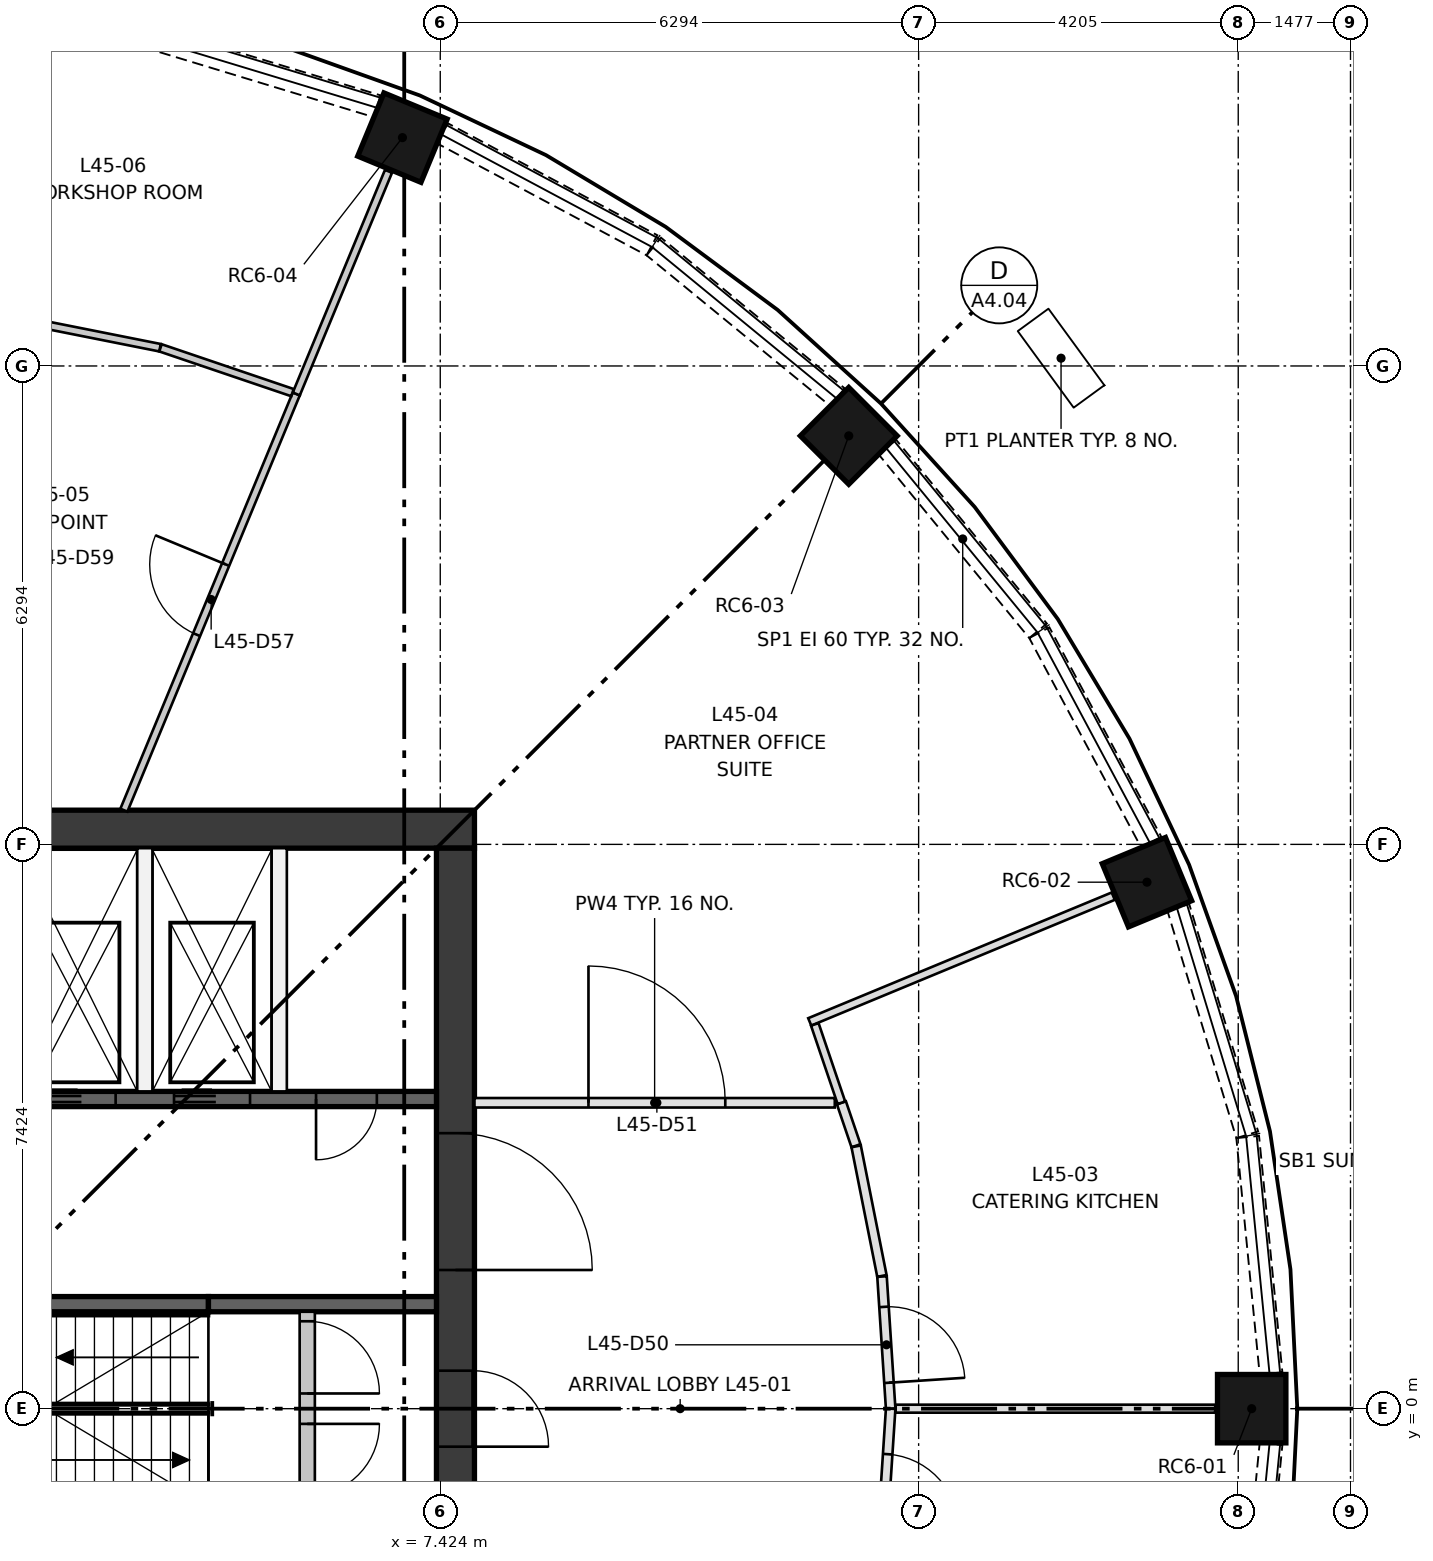
"""IFC4 building model, lengths in metres.
Left out: names, types, materials, properties, quantities, classifications, styles, units other than length and angle.
Written with IfcOpenShell. Run it as: python <this file> out.ifc"""

import sys

from ifc_helpers import new_model, si_unit, direction, frame, frame_2d, origin, origin_2d, place, context, subcontext, project, spatial, rectangle, extrude, element, fill, save


model = new_model("IFC4")
c1 = context("Model", 3, precision=1e-05, world=origin(), true_north=direction((0.0, 1.0)))
c2 = subcontext(c1, "Body", "Model", "MODEL_VIEW")
j1 = project(units=[si_unit("LENGTHUNIT", "METRE"), si_unit("PLANEANGLEUNIT", "RADIAN")], contexts=[c1])
p1 = place(None, origin())
s1 = spatial("IfcSite", under=j1, at=p1, CompositionType="ELEMENT")
p2 = place(p1, origin())
s2 = spatial("IfcBuilding", under=s1, at=p2, CompositionType="ELEMENT")
p3 = place(p2, frame((0.0, 0.0, 170.9)))
s3 = spatial("IfcBuildingStorey", under=s2, at=p3, CompositionType="ELEMENT", Elevation=170.9)
for number, where, z_axis, x_axis in (
    (1, (18.1, 0.0, 0.0), (0.0, 0.0, 1.0), (1.0, 0.0, 0.0)),
    (2, (16.722, 6.927, 0.0), (0.0, 0.0, 1.0), (0.924, 0.383, 0.0)),
    (3, (12.799, 12.799, 0.0), (0.0, 0.0, 1.0), (0.707, 0.707, 0.0)),
    (4, (6.927, 16.722, 0.0), (0.0, 0.0, 1.0), (0.383, 0.924, 0.0)),
):
    element("IfcColumn", number, at=place(p3, frame(where, z_axis=z_axis, x_axis=x_axis)), inside=s3, PredefinedType="COLUMN", context=c2, shape_type="SweptSolid", body=[
        extrude(rectangle(XDim=0.9, YDim=0.9, at=origin_2d()), origin(), (0.0, 0.0, 1.0), 3.35),
    ])
p4 = place(p3, frame((-7.874, 7.624, 0.0), z_axis=(0.0, 0.0, 1.0), x_axis=(1.0, 0.0, 0.0)))
e5 = element("IfcWall", 5, at=p4, inside=s3, PredefinedType="SHEAR", context=c2, shape_type="SweptSolid", body=[
    extrude(rectangle(XDim=15.748, YDim=0.5, at=frame_2d((7.874, 0.0))), origin(), (0.0, 0.0, 1.0), 3.35),
])
p5 = place(p3, frame((7.624, -7.374, 0.0), z_axis=(0.0, 0.0, 1.0), x_axis=(0.0, 1.0, 0.0)))
e6 = element("IfcWall", 6, at=p5, inside=s3, PredefinedType="SHEAR", context=c2, shape_type="SweptSolid", body=[
    extrude(rectangle(XDim=14.748, YDim=0.5, at=frame_2d((7.374, 0.0))), origin(), (0.0, 0.0, 1.0), 3.35),
])
p6 = place(p5, frame((6.874, 0.0, 0.0)))
e7 = element("IfcOpeningElement", 7, at=p6, cuts=e6, PredefinedType="OPENING", context=c2, shape_type="SweptSolid", body=[
    extrude(rectangle(XDim=1.0, YDim=2.1, at=frame_2d((0.5, 1.05))), frame((0.0, 0.26, 0.0), z_axis=(0.0, -1.0, 0.0), x_axis=(1.0, 0.0, 0.0)), (0.0, 0.0, 1.0), 0.52),
])
p7 = place(p5, frame((3.75, 0.0, 0.0)))
e8 = element("IfcOpeningElement", 8, at=p7, cuts=e6, PredefinedType="OPENING", context=c2, shape_type="SweptSolid", body=[
    extrude(rectangle(XDim=1.8, YDim=2.1, at=frame_2d((0.9, 1.05))), frame((0.0, 0.26, 0.0), z_axis=(0.0, -1.0, 0.0), x_axis=(1.0, 0.0, 0.0)), (0.0, 0.0, 1.0), 0.52),
])
p8 = place(p5, frame((9.198, 0.0, 0.0)))
e9 = element("IfcOpeningElement", 9, at=p8, cuts=e6, PredefinedType="OPENING", context=c2, shape_type="SweptSolid", body=[
    extrude(rectangle(XDim=1.8, YDim=2.1, at=frame_2d((0.9, 1.05))), frame((0.0, 0.26, 0.0), z_axis=(0.0, -1.0, 0.0), x_axis=(1.0, 0.0, 0.0)), (0.0, 0.0, 1.0), 0.52),
])
p9 = place(p3, frame((0.0, 4.074, 0.0), z_axis=(0.0, 0.0, 1.0), x_axis=(1.0, 0.0, 0.0)))
e10 = element("IfcWall", 10, at=p9, inside=s3, PredefinedType="SHEAR", context=c2, shape_type="SweptSolid", body=[
    extrude(rectangle(XDim=7.374, YDim=0.2, at=frame_2d((3.687, 0.0))), origin(), (0.0, 0.0, 1.0), 3.0),
])
p10 = place(p9, frame((0.384, 0.0, 0.0)))
e11 = element("IfcOpeningElement", 11, at=p10, cuts=e10, PredefinedType="OPENING", context=c2, shape_type="SweptSolid", body=[
    extrude(rectangle(XDim=1.0, YDim=2.1, at=frame_2d((0.5, 1.05))), frame((0.0, 0.11, 0.0), z_axis=(0.0, -1.0, 0.0), x_axis=(1.0, 0.0, 0.0)), (0.0, 0.0, 1.0), 0.22),
])
p11 = place(p9, frame((2.153, 0.0, 0.0)))
e12 = element("IfcOpeningElement", 12, at=p11, cuts=e10, PredefinedType="OPENING", context=c2, shape_type="SweptSolid", body=[
    extrude(rectangle(XDim=1.0, YDim=2.1, at=frame_2d((0.5, 1.05))), frame((0.0, 0.11, 0.0), z_axis=(0.0, -1.0, 0.0), x_axis=(1.0, 0.0, 0.0)), (0.0, 0.0, 1.0), 0.22),
])
p12 = place(p9, frame((3.921, 0.0, 0.0)))
e13 = element("IfcOpeningElement", 13, at=p12, cuts=e10, PredefinedType="OPENING", context=c2, shape_type="SweptSolid", body=[
    extrude(rectangle(XDim=1.0, YDim=2.1, at=frame_2d((0.5, 1.05))), frame((0.0, 0.11, 0.0), z_axis=(0.0, -1.0, 0.0), x_axis=(1.0, 0.0, 0.0)), (0.0, 0.0, 1.0), 0.22),
])
p13 = place(p9, frame((5.79, 0.0, 0.0)))
e14 = element("IfcOpeningElement", 14, at=p13, cuts=e10, PredefinedType="OPENING", context=c2, shape_type="SweptSolid", body=[
    extrude(rectangle(XDim=0.8, YDim=2.1, at=frame_2d((0.4, 1.05))), frame((0.0, 0.11, 0.0), z_axis=(0.0, -1.0, 0.0), x_axis=(1.0, 0.0, 0.0)), (0.0, 0.0, 1.0), 0.22),
])
p14 = place(p3, frame((0.0, 1.375, 0.0), z_axis=(0.0, 0.0, 1.0), x_axis=(1.0, 0.0, 0.0)))
e15 = element("IfcWall", 15, at=p14, inside=s3, PredefinedType="SHEAR", context=c2, shape_type="SweptSolid", body=[
    extrude(rectangle(XDim=4.374, YDim=0.2, at=frame_2d((2.187, 0.0))), origin(), (0.0, 0.0, 1.0), 3.0),
])
p15 = place(p3, frame((4.374, 1.375, 0.0), z_axis=(0.0, 0.0, 1.0), x_axis=(1.0, 0.0, 0.0)))
e16 = element("IfcWall", 16, at=p15, inside=s3, PredefinedType="SHEAR", context=c2, shape_type="SweptSolid", body=[
    extrude(rectangle(XDim=3.0, YDim=0.2, at=frame_2d((1.5, 0.0))), origin(), (0.0, 0.0, 1.0), 3.0),
])
for number, where, z_axis, x_axis in (
    (17, (3.537, 4.174, 0.0), (0.0, 0.0, 1.0), (0.0, 1.0, 0.0)),
    (18, (5.305, 4.174, 0.0), (0.0, 0.0, 1.0), (0.0, 1.0, 0.0)),
):
    element("IfcWall", number, at=place(p3, frame(where, z_axis=z_axis, x_axis=x_axis)), inside=s3, PredefinedType="PARTITIONING", context=c2, shape_type="SweptSolid", body=[
        extrude(rectangle(XDim=3.2, YDim=0.2, at=frame_2d((1.6, 0.0))), origin(), (0.0, 0.0, 1.0), 3.0),
    ])
p16 = place(p3, frame((5.674, -1.275, 0.0), z_axis=(0.0, 0.0, 1.0), x_axis=(0.0, 1.0, 0.0)))
e19 = element("IfcWall", 19, at=p16, inside=s3, PredefinedType="PARTITIONING", context=c2, shape_type="SweptSolid", body=[
    extrude(rectangle(XDim=2.55, YDim=0.2, at=frame_2d((1.275, 0.0))), origin(), (0.0, 0.0, 1.0), 3.0),
])
p17 = place(p16, frame((0.125, 0.0, 0.0)))
e20 = element("IfcOpeningElement", 20, at=p17, cuts=e19, PredefinedType="OPENING", context=c2, shape_type="SweptSolid", body=[
    extrude(rectangle(XDim=0.95, YDim=2.1, at=frame_2d((0.475, 1.05))), frame((0.0, 0.11, 0.0), z_axis=(0.0, -1.0, 0.0), x_axis=(1.0, 0.0, 0.0)), (0.0, 0.0, 1.0), 0.22),
])
p18 = place(p16, frame((1.475, 0.0, 0.0)))
e21 = element("IfcOpeningElement", 21, at=p18, cuts=e19, PredefinedType="OPENING", context=c2, shape_type="SweptSolid", body=[
    extrude(rectangle(XDim=0.95, YDim=2.1, at=frame_2d((0.475, 1.05))), frame((0.0, 0.11, 0.0), z_axis=(0.0, -1.0, 0.0), x_axis=(1.0, 0.0, 0.0)), (0.0, 0.0, 1.0), 0.22),
])
p19 = place(p3, frame((18.354, 0.464, 0.0), z_axis=(0.0, 0.0, 1.0), x_axis=(-0.098188848083, 0.995167799978, 0.0)))
e22 = element("IfcWall", 22, at=p19, inside=s3, PredefinedType="SOLIDWALL", context=c2, shape_type="SweptSolid", body=[
    extrude(rectangle(XDim=3.125, YDim=0.3, at=frame_2d((1.563, 0.0))), origin(), (0.0, 0.0, 1.0), 0.9),
])
p20 = place(p3, frame((18.042, 3.604, 0.0), z_axis=(0.0, 0.0, 1.0), x_axis=(-0.290083245834, 0.957001416136, 0.0)))
e23 = element("IfcWall", 23, at=p20, inside=s3, PredefinedType="SOLIDWALL", context=c2, shape_type="SweptSolid", body=[
    extrude(rectangle(XDim=3.127, YDim=0.3, at=frame_2d((1.563, 0.0))), origin(), (0.0, 0.0, 1.0), 0.9),
])
p21 = place(p3, frame((16.779, 7.452, 0.0), z_axis=(0.0, 0.0, 1.0), x_axis=(-0.47120441036, 0.882024038027, 0.0)))
e24 = element("IfcWall", 24, at=p21, inside=s3, PredefinedType="SOLIDWALL", context=c2, shape_type="SweptSolid", body=[
    extrude(rectangle(XDim=3.125, YDim=0.3, at=frame_2d((1.562, 0.0))), origin(), (0.0, 0.0, 1.0), 0.9),
])
for number, where, z_axis, x_axis in (
    (25, (15.29, 10.234, 0.0), (0.0, 0.0, 1.0), (-0.634, 0.773, 0.0)),
    (26, (12.651, 13.306, 0.0), (0.0, 0.0, 1.0), (-0.773, 0.634, 0.0)),
):
    element("IfcWall", number, at=place(p3, frame(where, z_axis=z_axis, x_axis=x_axis)), inside=s3, PredefinedType="SOLIDWALL", context=c2, shape_type="SweptSolid", body=[
        extrude(rectangle(XDim=3.127, YDim=0.3, at=frame_2d((1.563, 0.0))), origin(), (0.0, 0.0, 1.0), 0.9),
    ])
p22 = place(p3, frame((10.209, 15.306, 0.0), z_axis=(0.0, 0.0, 1.0), x_axis=(-0.882024038027, 0.47120441036, 0.0)))
e27 = element("IfcWall", 27, at=p22, inside=s3, PredefinedType="SOLIDWALL", context=c2, shape_type="SweptSolid", body=[
    extrude(rectangle(XDim=3.125, YDim=0.3, at=frame_2d((1.562, 0.0))), origin(), (0.0, 0.0, 1.0), 0.9),
])
p23 = place(p3, frame((6.596, 17.135, 0.0), z_axis=(0.0, 0.0, 1.0), x_axis=(-0.957001416136, 0.290083245834, 0.0)))
e28 = element("IfcWall", 28, at=p23, inside=s3, PredefinedType="SOLIDWALL", context=c2, shape_type="SweptSolid", body=[
    extrude(rectangle(XDim=3.127, YDim=0.3, at=frame_2d((1.563, 0.0))), origin(), (0.0, 0.0, 1.0), 0.9),
])
p24 = place(p3, frame((18.048, -3.574, 0.0), z_axis=(0.0, 0.0, 1.0), x_axis=(0.098188848083, 0.995167799978, 0.0)))
e29 = element("IfcWall", 29, at=p24, inside=s3, PredefinedType="SOLIDWALL", context=c2, shape_type="SweptSolid", body=[
    extrude(rectangle(XDim=3.125, YDim=0.3, at=frame_2d((1.563, 0.0))), origin(), (0.0, 0.0, 1.0), 0.9),
])
p25 = place(p3, frame((12.702, 4.024, 0.0), z_axis=(0.0, 0.0, 1.0), x_axis=(0.321374914787, -0.946952038989, 0.0)))
e30 = element("IfcWall", 30, at=p25, inside=s3, PredefinedType="PARTITIONING", context=c2, shape_type="SweptSolid", body=[
    extrude(rectangle(XDim=0.597, YDim=0.125, at=frame_2d((0.299, 0.0))), origin(), (0.0, 0.0, 1.0), 3.0),
])
p26 = place(p3, frame((12.896, 3.451, 0.0), z_axis=(0.0, 0.0, 1.0), x_axis=(0.195116516296, -0.980780069673, 0.0)))
e31 = element("IfcWall", 31, at=p26, inside=s3, PredefinedType="PARTITIONING", context=c2, shape_type="SweptSolid", body=[
    extrude(rectangle(XDim=1.738, YDim=0.125, at=frame_2d((0.869, 0.0))), origin(), (0.0, 0.0, 1.0), 3.0),
])
p27 = place(p3, frame((13.236, 1.738, 0.0), z_axis=(0.0, 0.0, 1.0), x_axis=(0.065449256286, -0.997855898841, 0.0)))
e32 = element("IfcWall", 32, at=p27, inside=s3, PredefinedType="PARTITIONING", context=c2, shape_type="SweptSolid", body=[
    extrude(rectangle(XDim=1.742, YDim=0.125, at=frame_2d((0.871, 0.0))), origin(), (0.0, 0.0, 1.0), 3.0),
])
p28 = place(p27, frame((0.4, 0.0, 0.0)))
e33 = element("IfcOpeningElement", 33, at=p28, cuts=e32, PredefinedType="OPENING", context=c2, shape_type="SweptSolid", body=[
    extrude(rectangle(XDim=1.0, YDim=2.1, at=frame_2d((0.5, 1.05))), frame((0.0, 0.073, 0.0), z_axis=(0.0, -1.0, 0.0), x_axis=(1.0, 0.0, 0.0)), (0.0, 0.0, 1.0), 0.145),
])
p29 = place(p3, frame((7.874, 4.024, 0.0), z_axis=(0.0, 0.0, 1.0), x_axis=(1.0, 0.0, 0.0)))
e34 = element("IfcWall", 34, at=p29, inside=s3, PredefinedType="PARTITIONING", context=c2, shape_type="SweptSolid", body=[
    extrude(rectangle(XDim=4.741, YDim=0.125, at=frame_2d((2.37, 0.0))), origin(), (0.0, 0.0, 1.0), 3.0),
])
p30 = place(p29, frame((1.5, 0.0, 0.0)))
e35 = element("IfcOpeningElement", 35, at=p30, cuts=e34, PredefinedType="OPENING", context=c2, shape_type="SweptSolid", body=[
    extrude(rectangle(XDim=1.8, YDim=2.1, at=frame_2d((0.9, 1.05))), frame((0.0, 0.073, 0.0), z_axis=(0.0, -1.0, 0.0), x_axis=(1.0, 0.0, 0.0)), (0.0, 0.0, 1.0), 0.145),
])
p31 = place(p3, frame((13.35, 0.0, 0.0), z_axis=(0.0, 0.0, 1.0), x_axis=(-0.065449256286, -0.997855898841, 0.0)))
e36 = element("IfcWall", 36, at=p31, inside=s3, PredefinedType="PARTITIONING", context=c2, shape_type="SweptSolid", body=[
    extrude(rectangle(XDim=1.742, YDim=0.125, at=frame_2d((0.871, 0.0))), origin(), (0.0, 0.0, 1.0), 3.0),
])
p32 = place(p31, frame((0.6, 0.0, 0.0)))
e37 = element("IfcOpeningElement", 37, at=p32, cuts=e36, PredefinedType="OPENING", context=c2, shape_type="SweptSolid", body=[
    extrude(rectangle(XDim=1.0, YDim=2.1, at=frame_2d((0.5, 1.05))), frame((0.0, 0.073, 0.0), z_axis=(0.0, -1.0, 0.0), x_axis=(1.0, 0.0, 0.0)), (0.0, 0.0, 1.0), 0.145),
])
p33 = place(p3, frame((12.285, 5.089, 0.0), z_axis=(0.0, 0.0, 1.0), x_axis=(0.923865378524, 0.382717601325, 0.0)))
e38 = element("IfcWall", 38, at=p33, inside=s3, PredefinedType="PARTITIONING", context=c2, shape_type="SweptSolid", body=[
    extrude(rectangle(XDim=4.323, YDim=0.105, at=frame_2d((2.161, 0.0))), origin(), (0.0, 0.0, 1.0), 3.0),
])
p34 = place(p3, frame((12.702, 4.024, 0.0), z_axis=(0.0, 0.0, 1.0), x_axis=(-0.321468654442, 0.946920220616, 0.0)))
e39 = element("IfcWall", 39, at=p34, inside=s3, PredefinedType="PARTITIONING", context=c2, shape_type="SweptSolid", body=[
    extrude(rectangle(XDim=1.089, YDim=0.105, at=frame_2d((0.544, 0.0))), origin(), (0.0, 0.0, 1.0), 3.0),
])
p35 = place(p3, frame((17.62, 0.0, 0.0), z_axis=(0.0, 0.0, 1.0), x_axis=(-1.0, 0.0, 0.0)))
e40 = element("IfcWall", 40, at=p35, inside=s3, PredefinedType="PARTITIONING", context=c2, shape_type="SweptSolid", body=[
    extrude(rectangle(XDim=4.204, YDim=0.105, at=frame_2d((2.102, 0.0))), origin(), (0.0, 0.0, 1.0), 3.0),
])
p36 = place(p3, frame((3.261, 7.874, 0.0), z_axis=(0.0, 0.0, 1.0), x_axis=(0.382690105068, 0.923876768559, 0.0)))
e41 = element("IfcWall", 41, at=p36, inside=s3, PredefinedType="PARTITIONING", context=c2, shape_type="SweptSolid", body=[
    extrude(rectangle(XDim=5.927, YDim=0.1, at=frame_2d((2.964, 0.0))), origin(), (0.0, 0.0, 1.0), 3.0),
])
p37 = place(p36, frame((2.5, 0.0, 0.0)))
e42 = element("IfcOpeningElement", 42, at=p37, cuts=e41, PredefinedType="OPENING", context=c2, shape_type="SweptSolid", body=[
    extrude(rectangle(XDim=1.0, YDim=2.1, at=frame_2d((0.5, 1.05))), frame((0.0, 0.06, 0.0), z_axis=(0.0, -1.0, 0.0), x_axis=(1.0, 0.0, 0.0)), (0.0, 0.0, 1.0), 0.12),
])
p38 = place(p3, frame((5.53, 13.35, 0.0), z_axis=(0.0, 0.0, 1.0), x_axis=(0.382689618566, 0.923876970079, 0.0)))
e43 = element("IfcWall", 43, at=p38, inside=s3, PredefinedType="PARTITIONING", context=c2, shape_type="SweptSolid", body=[
    extrude(rectangle(XDim=3.17, YDim=0.1, at=frame_2d((1.585, 0.0))), origin(), (0.0, 0.0, 1.0), 3.0),
])
p39 = place(p3, frame((1.889, 14.326, 0.0), z_axis=(0.0, 0.0, 1.0), x_axis=(0.980789493394, -0.195069140684, 0.0)))
e44 = element("IfcWall", 44, at=p39, inside=s3, PredefinedType="PARTITIONING", context=c2, shape_type="SweptSolid", body=[
    extrude(rectangle(XDim=1.884, YDim=0.1, at=frame_2d((0.942, 0.0))), origin(), (0.0, 0.0, 1.0), 3.0),
])
p40 = place(p3, frame((3.743, 13.957, 0.0), z_axis=(0.0, 0.0, 1.0), x_axis=(0.946938181516, -0.321415743839, 0.0)))
e45 = element("IfcWall", 45, at=p40, inside=s3, PredefinedType="PARTITIONING", context=c2, shape_type="SweptSolid", body=[
    extrude(rectangle(XDim=1.834, YDim=0.1, at=frame_2d((0.917, 0.0))), origin(), (0.0, 0.0, 1.0), 3.0),
])
p41 = place(p11, frame((1.0, 0.0, 0.0), z_axis=(0.0, 0.0, 1.0), x_axis=(-1.0, 0.0, 0.0)))
e46 = element("IfcDoor", 46, at=p41, inside=s3, OperationType="DOUBLE_DOOR_SLIDING", PredefinedType="DOOR", context=c2, shape_type="SweptSolid", body=[
    extrude(rectangle(XDim=1.0, YDim=2.1, at=frame_2d((0.5, 1.05))), frame((0.0, 0.025, 0.0), z_axis=(0.0, -1.0, 0.0), x_axis=(1.0, 0.0, 0.0)), (0.0, 0.0, 1.0), 0.05),
])
fill(e12, e46)
p42 = place(p12, frame((1.0, 0.0, 0.0), z_axis=(0.0, 0.0, 1.0), x_axis=(-1.0, 0.0, 0.0)))
e47 = element("IfcDoor", 47, at=p42, inside=s3, OperationType="DOUBLE_DOOR_SLIDING", PredefinedType="DOOR", context=c2, shape_type="SweptSolid", body=[
    extrude(rectangle(XDim=1.0, YDim=2.1, at=frame_2d((0.5, 1.05))), frame((0.0, 0.025, 0.0), z_axis=(0.0, -1.0, 0.0), x_axis=(1.0, 0.0, 0.0)), (0.0, 0.0, 1.0), 0.05),
])
fill(e13, e47)
p43 = place(p17, frame((0.95, 0.0, 0.0), z_axis=(0.0, 0.0, 1.0), x_axis=(-1.0, 0.0, 0.0)))
e48 = element("IfcDoor", 48, at=p43, inside=s3, OperationType="SINGLE_SWING_RIGHT", PredefinedType="DOOR", context=c2, shape_type="SweptSolid", body=[
    extrude(rectangle(XDim=0.95, YDim=2.1, at=frame_2d((0.475, 1.05))), frame((0.0, 0.025, 0.0), z_axis=(0.0, -1.0, 0.0), x_axis=(1.0, 0.0, 0.0)), (0.0, 0.0, 1.0), 0.05),
])
fill(e20, e48)
p44 = place(p18, frame((0.95, 0.0, 0.0), z_axis=(0.0, 0.0, 1.0), x_axis=(-1.0, 0.0, 0.0)))
e49 = element("IfcDoor", 49, at=p44, inside=s3, OperationType="SINGLE_SWING_LEFT", PredefinedType="DOOR", context=c2, shape_type="SweptSolid", body=[
    extrude(rectangle(XDim=0.95, YDim=2.1, at=frame_2d((0.475, 1.05))), frame((0.0, 0.025, 0.0), z_axis=(0.0, -1.0, 0.0), x_axis=(1.0, 0.0, 0.0)), (0.0, 0.0, 1.0), 0.05),
])
fill(e21, e49)
p45 = place(p13, frame((0.8, 0.0, 0.0), z_axis=(0.0, 0.0, 1.0), x_axis=(-1.0, 0.0, 0.0)))
e50 = element("IfcDoor", 50, at=p45, inside=s3, OperationType="SINGLE_SWING_LEFT", PredefinedType="DOOR", context=c2, shape_type="SweptSolid", body=[
    extrude(rectangle(XDim=0.8, YDim=2.1, at=frame_2d((0.4, 1.05))), frame((0.0, 0.025, 0.0), z_axis=(0.0, -1.0, 0.0), x_axis=(1.0, 0.0, 0.0)), (0.0, 0.0, 1.0), 0.05),
])
fill(e14, e50)
p46 = place(p6, frame((1.0, 0.0, 0.0), z_axis=(0.0, 0.0, 1.0), x_axis=(-1.0, 0.0, 0.0)))
e51 = element("IfcDoor", 51, at=p46, inside=s3, OperationType="SINGLE_SWING_LEFT", PredefinedType="DOOR", context=c2, shape_type="SweptSolid", body=[
    extrude(rectangle(XDim=1.0, YDim=2.1, at=frame_2d((0.5, 1.05))), frame((0.0, 0.25, 0.0), z_axis=(0.0, -1.0, 0.0), x_axis=(1.0, 0.0, 0.0)), (0.0, 0.0, 1.0), 0.05),
])
fill(e7, e51)
p47 = place(p8, frame((1.8, 0.0, 0.0), z_axis=(0.0, 0.0, 1.0), x_axis=(-1.0, 0.0, 0.0)))
e52 = element("IfcDoor", 52, at=p47, inside=s3, OperationType="DOUBLE_DOOR_SINGLE_SWING", PredefinedType="DOOR", context=c2, shape_type="SweptSolid", body=[
    extrude(rectangle(XDim=1.8, YDim=2.1, at=frame_2d((0.9, 1.05))), frame((0.0, 0.025, 0.0), z_axis=(0.0, -1.0, 0.0), x_axis=(1.0, 0.0, 0.0)), (0.0, 0.0, 1.0), 0.05),
])
fill(e9, e52)
p48 = place(p28, origin())
e53 = element("IfcDoor", 53, at=p48, inside=s3, OperationType="SINGLE_SWING_RIGHT", PredefinedType="DOOR", context=c2, shape_type="SweptSolid", body=[
    extrude(rectangle(XDim=1.0, YDim=2.1, at=frame_2d((0.5, 1.05))), frame((0.0, 0.025, 0.0), z_axis=(0.0, -1.0, 0.0), x_axis=(1.0, 0.0, 0.0)), (0.0, 0.0, 1.0), 0.05),
])
fill(e33, e53)
p49 = place(p30, origin())
e54 = element("IfcDoor", 54, at=p49, inside=s3, OperationType="DOUBLE_DOOR_SINGLE_SWING", PredefinedType="DOOR", context=c2, shape_type="SweptSolid", body=[
    extrude(rectangle(XDim=1.8, YDim=2.1, at=frame_2d((0.9, 1.05))), frame((0.0, 0.025, 0.0), z_axis=(0.0, -1.0, 0.0), x_axis=(1.0, 0.0, 0.0)), (0.0, 0.0, 1.0), 0.05),
])
fill(e35, e54)
p50 = place(p32, origin())
e55 = element("IfcDoor", 55, at=p50, inside=s3, OperationType="SINGLE_SWING_RIGHT", PredefinedType="DOOR", context=c2, shape_type="SweptSolid", body=[
    extrude(rectangle(XDim=1.0, YDim=2.1, at=frame_2d((0.5, 1.05))), frame((0.0, 0.025, 0.0), z_axis=(0.0, -1.0, 0.0), x_axis=(1.0, 0.0, 0.0)), (0.0, 0.0, 1.0), 0.05),
])
fill(e37, e55)
p51 = place(p37, origin())
e56 = element("IfcDoor", 56, at=p51, inside=s3, OperationType="SINGLE_SWING_RIGHT", PredefinedType="DOOR", context=c2, shape_type="SweptSolid", body=[
    extrude(rectangle(XDim=1.0, YDim=2.1, at=frame_2d((0.5, 1.05))), frame((0.0, 0.025, 0.0), z_axis=(0.0, -1.0, 0.0), x_axis=(1.0, 0.0, 0.0)), (0.0, 0.0, 1.0), 0.05),
])
fill(e42, e56)
save(model, sys.argv[1])
